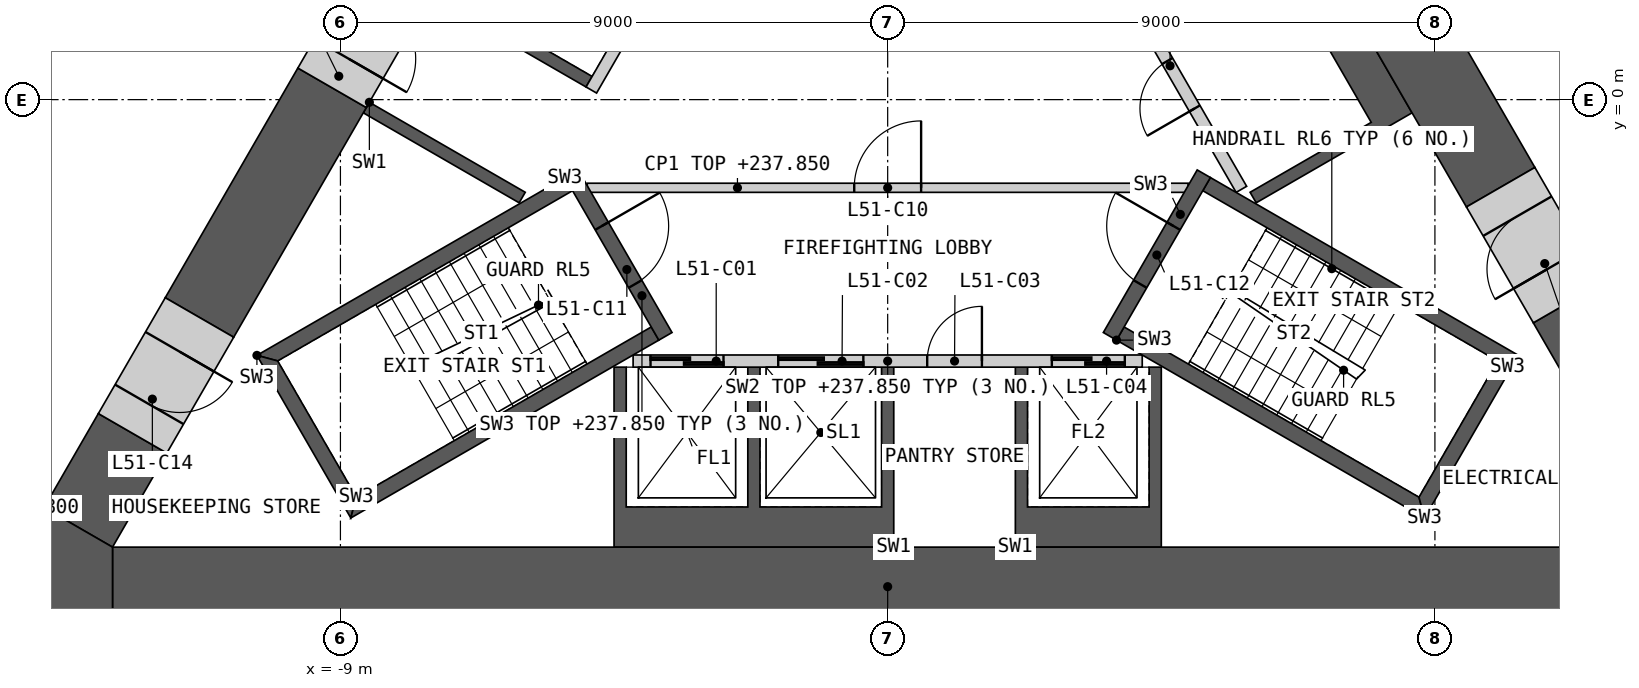
"""IFC4 building model, lengths in metres.
Left out: names, types, materials, properties, quantities, classifications, styles, units other than length and angle.
Written with IfcOpenShell. Run it as: python <this file> out.ifc"""

import sys

from ifc_helpers import new_model, si_unit, direction, frame, frame_2d, origin, place, context, subcontext, project, spatial, polyline, rectangle, outline, extrude, element, fill, save


model = new_model("IFC4")
c1 = context("Model", 3, precision=1e-05, world=origin(), true_north=direction((0.0, 1.0)))
c2 = subcontext(c1, "Body", "Model", "MODEL_VIEW")
j1 = project(units=[si_unit("LENGTHUNIT", "METRE"), si_unit("PLANEANGLEUNIT", "RADIAN")], contexts=[c1])
p1 = place(None, origin())
s1 = spatial("IfcSite", under=j1, at=p1, CompositionType="ELEMENT")
p2 = place(p1, origin())
s2 = spatial("IfcBuilding", under=s1, at=p2, CompositionType="ELEMENT")
p3 = place(p2, frame((0.0, 0.0, 234.6)))
s3 = spatial("IfcBuildingStorey", under=s2, at=p3, CompositionType="ELEMENT", Elevation=234.6)
p4 = place(p3, origin())
e1 = element("IfcWall", 1, at=p4, inside=s3, PredefinedType="SHEAR", context=c2, shape_type="SweptSolid", body=[
    extrude(outline(polyline([(0.1, -7.36), (-4.5, -7.36), (-4.5, -4.4), (-4.3, -4.4), (-4.3, -6.7), (-2.3, -6.7), (-2.3, -4.4), (-2.1, -4.4), (-2.1, -6.7), (-0.1, -6.7), (-0.1, -4.4), (0.1, -4.4), (0.1, -7.36)])), origin(), (0.0, 0.0, 1.0), 3.25),
])
p5 = place(p3, origin())
e2 = element("IfcWall", 2, at=p5, inside=s3, PredefinedType="SHEAR", context=c2, shape_type="SweptSolid", body=[
    extrude(outline(polyline([(2.1, -7.36), (2.1, -4.4), (2.3, -4.4), (2.3, -6.7), (4.3, -6.7), (4.3, -4.4), (4.5, -4.4), (4.5, -7.36), (2.1, -7.36)])), origin(), (0.0, 0.0, 1.0), 3.25),
])
p6 = place(p3, frame((-4.187, -4.3, 0.0), z_axis=(0.0, 0.0, 1.0), x_axis=(1.0, 0.0, 0.0)))
e3 = element("IfcWall", 3, at=p6, inside=s3, PredefinedType="SOLIDWALL", context=c2, shape_type="SweptSolid", body=[
    extrude(rectangle(XDim=8.373, YDim=0.2, at=frame_2d((4.187, 0.0))), origin(), (0.0, 0.0, 1.0), 3.25),
])
p7 = place(p6, frame((0.287, 0.0, 0.0)))
e4 = element("IfcOpeningElement", 4, at=p7, cuts=e3, PredefinedType="OPENING", context=c2, shape_type="SweptSolid", body=[
    extrude(rectangle(XDim=1.2, YDim=2.1, at=frame_2d((0.6, 1.05))), frame((0.0, 0.11, 0.0), z_axis=(0.0, -1.0, 0.0), x_axis=(1.0, 0.0, 0.0)), (0.0, 0.0, 1.0), 0.22),
])
p8 = place(p6, frame((2.387, 0.0, 0.0)))
e5 = element("IfcOpeningElement", 5, at=p8, cuts=e3, PredefinedType="OPENING", context=c2, shape_type="SweptSolid", body=[
    extrude(rectangle(XDim=1.4, YDim=2.1, at=frame_2d((0.7, 1.05))), frame((0.0, 0.11, 0.0), z_axis=(0.0, -1.0, 0.0), x_axis=(1.0, 0.0, 0.0)), (0.0, 0.0, 1.0), 0.22),
])
p9 = place(p6, frame((4.837, 0.0, 0.0)))
e6 = element("IfcOpeningElement", 6, at=p9, cuts=e3, PredefinedType="OPENING", context=c2, shape_type="SweptSolid", body=[
    extrude(rectangle(XDim=0.9, YDim=2.1, at=frame_2d((0.45, 1.05))), frame((0.0, 0.11, 0.0), z_axis=(0.0, -1.0, 0.0), x_axis=(1.0, 0.0, 0.0)), (0.0, 0.0, 1.0), 0.22),
])
p10 = place(p6, frame((6.887, 0.0, 0.0)))
e7 = element("IfcOpeningElement", 7, at=p10, cuts=e3, PredefinedType="OPENING", context=c2, shape_type="SweptSolid", body=[
    extrude(rectangle(XDim=1.2, YDim=2.1, at=frame_2d((0.6, 1.05))), frame((0.0, 0.11, 0.0), z_axis=(0.0, -1.0, 0.0), x_axis=(1.0, 0.0, 0.0)), (0.0, 0.0, 1.0), 0.22),
])
p11 = place(p3, origin())
e8 = element("IfcWall", 8, at=p11, inside=s3, PredefinedType="SHEAR", context=c2, shape_type="SweptSolid", body=[
    extrude(outline(polyline([(6.324, 3.767), (8.624, -0.217), (8.231, -0.444), (6.061, -1.697), (5.96, -1.524), (7.952, -0.374), (5.852, 3.263), (3.861, 2.113), (3.76, 2.287), (5.931, 3.54), (6.324, 3.767)])), origin(), (0.0, 0.0, 1.0), 3.25),
])
p12 = place(p3, frame((5.817, -1.476, 0.0), z_axis=(0.0, 0.0, 1.0), x_axis=(-0.500002616675, 0.866023893041, 0.0)))
e9 = element("IfcWall", 9, at=p12, inside=s3, PredefinedType="SOLIDWALL", context=c2, shape_type="SweptSolid", body=[
    extrude(rectangle(XDim=8.373, YDim=0.2, at=frame_2d((4.187, 0.0))), origin(), (0.0, 0.0, 1.0), 3.25),
])
p13 = place(p12, frame((1.537, 0.0, 0.0)))
e10 = element("IfcOpeningElement", 10, at=p13, cuts=e9, PredefinedType="OPENING", context=c2, shape_type="SweptSolid", body=[
    extrude(rectangle(XDim=0.9, YDim=2.1, at=frame_2d((0.45, 1.05))), frame((0.0, 0.11, 0.0), z_axis=(0.0, -1.0, 0.0), x_axis=(1.0, 0.0, 0.0)), (0.0, 0.0, 1.0), 0.22),
])
p14 = place(p12, frame((4.837, 0.0, 0.0)))
e11 = element("IfcOpeningElement", 11, at=p14, cuts=e9, PredefinedType="OPENING", context=c2, shape_type="SweptSolid", body=[
    extrude(rectangle(XDim=0.9, YDim=2.1, at=frame_2d((0.45, 1.05))), frame((0.0, 0.11, 0.0), z_axis=(0.0, -1.0, 0.0), x_axis=(1.0, 0.0, 0.0)), (0.0, 0.0, 1.0), 0.22),
])
p15 = place(p12, frame((6.937, 0.0, 0.0)))
e12 = element("IfcOpeningElement", 12, at=p15, cuts=e9, PredefinedType="OPENING", context=c2, shape_type="SweptSolid", body=[
    extrude(rectangle(XDim=1.1, YDim=2.1, at=frame_2d((0.55, 1.05))), frame((0.0, 0.11, 0.0), z_axis=(0.0, -1.0, 0.0), x_axis=(1.0, 0.0, 0.0)), (0.0, 0.0, 1.0), 0.22),
])
p16 = place(p3, origin())
e13 = element("IfcWall", 13, at=p16, inside=s3, PredefinedType="SHEAR", context=c2, shape_type="SweptSolid", body=[
    extrude(outline(polyline([(-7.524, 1.688), (-4.124, 7.577), (-3.731, 7.35), (-1.561, 6.097), (-1.66, 5.924), (-3.652, 7.074), (-4.652, 5.342), (-2.66, 4.192), (-2.76, 4.019), (-4.752, 5.169), (-5.752, 3.437), (-3.76, 2.287), (-3.861, 2.113), (-5.852, 3.263), (-6.852, 1.531), (-4.861, 0.381), (-4.96, 0.208), (-7.131, 1.461), (-7.524, 1.688)])), origin(), (0.0, 0.0, 1.0), 3.25),
])
p17 = place(p3, origin())
e14 = element("IfcWall", 14, at=p17, inside=s3, PredefinedType="SHEAR", context=c2, shape_type="SweptSolid", body=[
    extrude(outline(polyline([(-8.524, -0.044), (-8.131, -0.271), (-5.96, -1.524), (-6.061, -1.697), (-8.231, -0.444), (-8.624, -0.217), (-8.524, -0.044)])), origin(), (0.0, 0.0, 1.0), 3.25),
])
p18 = place(p3, frame((-1.631, 5.776, 0.0), z_axis=(0.0, 0.0, 1.0), x_axis=(-0.499992876559, -0.866029516466, 0.0)))
e15 = element("IfcWall", 15, at=p18, inside=s3, PredefinedType="SOLIDWALL", context=c2, shape_type="SweptSolid", body=[
    extrude(rectangle(XDim=6.486, YDim=0.2, at=frame_2d((3.243, 0.0))), origin(), (0.0, 0.0, 1.0), 3.25),
])
p19 = place(p18, frame((0.337, 0.0, 0.0)))
e16 = element("IfcOpeningElement", 16, at=p19, cuts=e15, PredefinedType="OPENING", context=c2, shape_type="SweptSolid", body=[
    extrude(rectangle(XDim=1.1, YDim=2.1, at=frame_2d((0.55, 1.05))), frame((0.0, 0.11, 0.0), z_axis=(0.0, -1.0, 0.0), x_axis=(1.0, 0.0, 0.0)), (0.0, 0.0, 1.0), 0.22),
])
p20 = place(p18, frame((2.537, 0.0, 0.0)))
e17 = element("IfcOpeningElement", 17, at=p20, cuts=e15, PredefinedType="OPENING", context=c2, shape_type="SweptSolid", body=[
    extrude(rectangle(XDim=1.1, YDim=2.1, at=frame_2d((0.55, 1.05))), frame((0.0, 0.11, 0.0), z_axis=(0.0, -1.0, 0.0), x_axis=(1.0, 0.0, 0.0)), (0.0, 0.0, 1.0), 0.22),
])
p21 = place(p3, frame((-4.941, -1.45, 0.0), z_axis=(0.0, 0.0, 1.0), x_axis=(1.0, 0.0, 0.0)))
e18 = element("IfcWall", 18, at=p21, inside=s3, PredefinedType="PARTITIONING", context=c2, shape_type="SweptSolid", body=[
    extrude(rectangle(XDim=9.882, YDim=0.15, at=frame_2d((4.941, 0.0))), origin(), (0.0, 0.0, 1.0), 3.25),
])
p22 = place(p21, frame((4.391, 0.0, 0.0)))
e19 = element("IfcOpeningElement", 19, at=p22, cuts=e18, PredefinedType="OPENING", context=c2, shape_type="SweptSolid", body=[
    extrude(rectangle(XDim=1.1, YDim=2.1, at=frame_2d((0.55, 1.05))), frame((0.0, 0.085, 0.0), z_axis=(0.0, -1.0, 0.0), x_axis=(1.0, 0.0, 0.0)), (0.0, 0.0, 1.0), 0.17),
])
p23 = place(p3, origin())
e20 = element("IfcWall", 20, at=p23, inside=s3, PredefinedType="SHEAR", context=c2, shape_type="SweptSolid", body=[
    extrude(outline(polyline([(-5.307, -1.281), (-10.374, -4.206), (-10.032, -4.298), (-5.182, -1.498), (-5.307, -1.281)])), origin(), (0.0, 0.0, 1.0), 3.25),
])
p24 = place(p3, origin())
e21 = element("IfcWall", 21, at=p24, inside=s3, PredefinedType="SHEAR", context=c2, shape_type="SweptSolid", body=[
    extrude(outline(polyline([(-10.374, -4.206), (-8.83, -6.881), (-8.738, -6.539), (-10.032, -4.298), (-10.374, -4.206)])), origin(), (0.0, 0.0, 1.0), 3.25),
])
p25 = place(p3, origin())
e22 = element("IfcWall", 22, at=p25, inside=s3, PredefinedType="SHEAR", context=c2, shape_type="SweptSolid", body=[
    extrude(outline(polyline([(-8.738, -6.539), (-8.83, -6.881), (-3.763, -3.956), (-3.888, -3.739), (-8.738, -6.539)])), origin(), (0.0, 0.0, 1.0), 3.25),
])
p26 = place(p3, frame((-5.199, -1.219, 0.0), z_axis=(0.0, 0.0, 1.0), x_axis=(0.499982516597, -0.866035497597, 0.0)))
e23 = element("IfcWall", 23, at=p26, inside=s3, PredefinedType="SHEAR", context=c2, shape_type="SweptSolid", body=[
    extrude(rectangle(XDim=3.088, YDim=0.25, at=frame_2d((1.544, 0.0))), origin(), (0.0, 0.0, 1.0), 3.25),
])
p27 = place(p26, frame((0.994, 0.0, 0.0)))
e24 = element("IfcOpeningElement", 24, at=p27, cuts=e23, PredefinedType="OPENING", context=c2, shape_type="SweptSolid", body=[
    extrude(rectangle(XDim=1.1, YDim=2.1, at=frame_2d((0.55, 1.05))), frame((0.0, 0.135, 0.0), z_axis=(0.0, -1.0, 0.0), x_axis=(1.0, 0.0, 0.0)), (0.0, 0.0, 1.0), 0.27),
])
p28 = place(p3, origin())
e25 = element("IfcWall", 25, at=p28, inside=s3, PredefinedType="SHEAR", context=c2, shape_type="SweptSolid", body=[
    extrude(outline(polyline([(3.763, -3.956), (8.83, -6.881), (8.738, -6.539), (3.888, -3.739), (3.763, -3.956)])), origin(), (0.0, 0.0, 1.0), 3.25),
])
p29 = place(p3, origin())
e26 = element("IfcWall", 26, at=p29, inside=s3, PredefinedType="SHEAR", context=c2, shape_type="SweptSolid", body=[
    extrude(outline(polyline([(8.83, -6.881), (10.374, -4.206), (10.032, -4.298), (8.738, -6.539), (8.83, -6.881)])), origin(), (0.0, 0.0, 1.0), 3.25),
])
p30 = place(p3, origin())
e27 = element("IfcWall", 27, at=p30, inside=s3, PredefinedType="SHEAR", context=c2, shape_type="SweptSolid", body=[
    extrude(outline(polyline([(10.032, -4.298), (10.374, -4.206), (5.307, -1.281), (5.182, -1.498), (10.032, -4.298)])), origin(), (0.0, 0.0, 1.0), 3.25),
])
p31 = place(p3, frame((3.655, -3.893, 0.0), z_axis=(0.0, 0.0, 1.0), x_axis=(0.499982516597, 0.866035497597, 0.0)))
e28 = element("IfcWall", 28, at=p31, inside=s3, PredefinedType="SHEAR", context=c2, shape_type="SweptSolid", body=[
    extrude(rectangle(XDim=3.088, YDim=0.25, at=frame_2d((1.544, 0.0))), origin(), (0.0, 0.0, 1.0), 3.25),
])
p32 = place(p31, frame((0.994, 0.0, 0.0)))
e29 = element("IfcOpeningElement", 29, at=p32, cuts=e28, PredefinedType="OPENING", context=c2, shape_type="SweptSolid", body=[
    extrude(rectangle(XDim=1.1, YDim=2.1, at=frame_2d((0.55, 1.05))), frame((0.0, 0.135, 0.0), z_axis=(0.0, -1.0, 0.0), x_axis=(1.0, 0.0, 0.0)), (0.0, 0.0, 1.0), 0.27),
])
p33 = place(p3, frame((-12.748, -8.01, 0.0), z_axis=(0.0, 0.0, 1.0), x_axis=(1.0, 0.0, 0.0)))
e30 = element("IfcWall", 30, at=p33, inside=s3, PredefinedType="SHEAR", context=c2, shape_type="SweptSolid", body=[
    extrude(rectangle(XDim=25.497, YDim=1.3, at=frame_2d((12.748, 0.0))), origin(), (0.0, 0.0, 1.0), 3.25),
])
p34 = place(p3, frame((10.081, -1.441, 0.0), z_axis=(0.0, 0.0, 1.0), x_axis=(-0.500012180433, 0.866018371294, 0.0)))
e31 = element("IfcWall", 31, at=p34, inside=s3, PredefinedType="SHEAR", context=c2, shape_type="SweptSolid", body=[
    extrude(rectangle(XDim=15.05, YDim=1.3, at=frame_2d((7.525, 0.0))), origin(), (0.0, 0.0, 1.0), 3.25),
])
p35 = place(p3, frame((13.311, -7.035, 0.0), z_axis=(0.0, 0.0, 1.0), x_axis=(-0.500003555838, 0.866023350811, 0.0)))
e32 = element("IfcWall", 32, at=p35, inside=s3, PredefinedType="SHEAR", context=c2, shape_type="SweptSolid", body=[
    extrude(rectangle(XDim=4.26, YDim=1.3, at=frame_2d((2.13, 0.0))), origin(), (0.0, 0.0, 1.0), 3.25),
])
p36 = place(p3, frame((-9.137, 0.195, 0.0), z_axis=(0.0, 0.0, 1.0), x_axis=(-0.499985697398, -0.866033661238, 0.0)))
e33 = element("IfcWall", 33, at=p36, inside=s3, PredefinedType="SHEAR", context=c2, shape_type="SweptSolid", body=[
    extrude(rectangle(XDim=4.362, YDim=1.3, at=frame_2d((2.181, 0.0))), origin(), (0.0, 0.0, 1.0), 3.25),
])
p37 = place(p3, frame((-12.418, -5.488, 0.0), z_axis=(0.0, 0.0, 1.0), x_axis=(-0.499931460552, -0.866064971437, 0.0)))
e34 = element("IfcWall", 34, at=p37, inside=s3, PredefinedType="SHEAR", context=c2, shape_type="SweptSolid", body=[
    extrude(rectangle(XDim=1.786, YDim=1.3, at=frame_2d((0.893, 0.0))), origin(), (0.0, 0.0, 1.0), 3.25),
])
p38 = place(p3, origin())
e35 = element("IfcWall", 35, at=p38, inside=s3, PredefinedType="SHEAR", context=c2, shape_type="SweptSolid", body=[
    extrude(outline(polyline([(-13.874, -6.71), (-12.748, -7.36), (-12.748, -8.66), (-15.0, -8.66), (-13.874, -6.71)])), origin(), (0.0, 0.0, 1.0), 3.25),
])
p39 = place(p3, frame((-11.318, -3.583, 0.0), z_axis=(0.0, 0.0, 1.0), x_axis=(-0.50002983664, -0.866008176907, 0.0)))
e36 = element("IfcWall", 36, at=p39, inside=s3, PredefinedType="SHEAR", context=c2, shape_type="SweptSolid", body=[
    extrude(rectangle(XDim=2.2, YDim=1.3, at=frame_2d((1.1, 0.0))), origin(), (0.0, 0.0, 1.0), 3.25),
])
p40 = place(p39, frame((0.65, 0.0, 0.0)))
e37 = element("IfcOpeningElement", 37, at=p40, cuts=e36, PredefinedType="OPENING", context=c2, shape_type="SweptSolid", body=[
    extrude(rectangle(XDim=1.0, YDim=2.1, at=frame_2d((0.5, 1.05))), frame((0.0, 0.66, 0.0), z_axis=(0.0, -1.0, 0.0), x_axis=(1.0, 0.0, 0.0)), (0.0, 0.0, 1.0), 1.32),
])
p41 = place(p3, frame((11.181, -3.346, 0.0), z_axis=(0.0, 0.0, 1.0), x_axis=(-0.499946605688, 0.86605622881, 0.0)))
e38 = element("IfcWall", 38, at=p41, inside=s3, PredefinedType="SHEAR", context=c2, shape_type="SweptSolid", body=[
    extrude(rectangle(XDim=2.2, YDim=1.3, at=frame_2d((1.1, 0.0))), origin(), (0.0, 0.0, 1.0), 3.25),
])
p42 = place(p41, frame((0.65, 0.0, 0.0)))
e39 = element("IfcOpeningElement", 39, at=p42, cuts=e38, PredefinedType="OPENING", context=c2, shape_type="SweptSolid", body=[
    extrude(rectangle(XDim=1.0, YDim=2.1, at=frame_2d((0.5, 1.05))), frame((0.0, 0.66, 0.0), z_axis=(0.0, -1.0, 0.0), x_axis=(1.0, 0.0, 0.0)), (0.0, 0.0, 1.0), 1.32),
])
p43 = place(p3, frame((-8.037, 2.1, 0.0), z_axis=(0.0, 0.0, 1.0), x_axis=(-0.50002983664, -0.866008176907, 0.0)))
e40 = element("IfcWall", 40, at=p43, inside=s3, PredefinedType="SHEAR", context=c2, shape_type="SweptSolid", body=[
    extrude(rectangle(XDim=2.2, YDim=1.3, at=frame_2d((1.1, 0.0))), origin(), (0.0, 0.0, 1.0), 3.25),
])
p44 = place(p43, frame((0.55, 0.0, 0.0)))
e41 = element("IfcOpeningElement", 41, at=p44, cuts=e40, PredefinedType="OPENING", context=c2, shape_type="SweptSolid", body=[
    extrude(rectangle(XDim=1.1, YDim=2.1, at=frame_2d((0.55, 1.05))), frame((0.0, 0.66, 0.0), z_axis=(0.0, -1.0, 0.0), x_axis=(1.0, 0.0, 0.0)), (0.0, 0.0, 1.0), 1.32),
])
p45 = place(p3, frame((-18.976, -4.747, 0.0), z_axis=(0.0, 0.0, 1.0), x_axis=(0.499999852422, 0.866025488988, 0.0)))
e42 = element("IfcWall", 42, at=p45, inside=s3, PredefinedType="PARTITIONING", context=c2, shape_type="SweptSolid", body=[
    extrude(rectangle(XDim=27.198, YDim=0.2, at=frame_2d((13.599, 0.0))), origin(), (0.0, 0.0, 1.0), 3.25),
])
p46 = place(p45, frame((25.346, 0.0, 0.0)))
e43 = element("IfcOpeningElement", 43, at=p46, cuts=e42, PredefinedType="OPENING", context=c2, shape_type="SweptSolid", body=[
    extrude(rectangle(XDim=1.1, YDim=2.1, at=frame_2d((0.55, 1.05))), frame((0.0, 0.11, 0.0), z_axis=(0.0, -1.0, 0.0), x_axis=(1.0, 0.0, 0.0)), (0.0, 0.0, 1.0), 0.22),
])
p47 = place(p45, frame((16.713, 0.0, 0.0)))
e44 = element("IfcOpeningElement", 44, at=p47, cuts=e42, PredefinedType="OPENING", context=c2, shape_type="SweptSolid", body=[
    extrude(rectangle(XDim=1.1, YDim=2.1, at=frame_2d((0.55, 1.05))), frame((0.0, 0.11, 0.0), z_axis=(0.0, -1.0, 0.0), x_axis=(1.0, 0.0, 0.0)), (0.0, 0.0, 1.0), 0.22),
])
p48 = place(p45, frame((0.35, 0.0, 0.0)))
e45 = element("IfcOpeningElement", 45, at=p48, cuts=e42, PredefinedType="OPENING", context=c2, shape_type="SweptSolid", body=[
    extrude(rectangle(XDim=1.1, YDim=2.1, at=frame_2d((0.55, 1.05))), frame((0.0, 0.11, 0.0), z_axis=(0.0, -1.0, 0.0), x_axis=(1.0, 0.0, 0.0)), (0.0, 0.0, 1.0), 0.22),
])
p49 = place(p3, frame((9.699, 5.321, 0.0), z_axis=(0.0, 0.0, 1.0), x_axis=(0.49998193945, -0.866035830797, 0.0)))
e46 = element("IfcWall", 46, at=p49, inside=s3, PredefinedType="PARTITIONING", context=c2, shape_type="SweptSolid", body=[
    extrude(rectangle(XDim=9.094, YDim=0.2, at=frame_2d((4.547, 0.0))), origin(), (0.0, 0.0, 1.0), 3.25),
])
p50 = place(p49, frame((5.212, 0.0, 0.0)))
e47 = element("IfcOpeningElement", 47, at=p50, cuts=e46, PredefinedType="OPENING", context=c2, shape_type="SweptSolid", body=[
    extrude(rectangle(XDim=1.0, YDim=2.1, at=frame_2d((0.5, 1.05))), frame((0.0, 0.11, 0.0), z_axis=(0.0, -1.0, 0.0), x_axis=(1.0, 0.0, 0.0)), (0.0, 0.0, 1.0), 0.22),
])
p51 = place(p49, frame((1.162, 0.0, 0.0)))
e48 = element("IfcOpeningElement", 48, at=p51, cuts=e46, PredefinedType="OPENING", context=c2, shape_type="SweptSolid", body=[
    extrude(rectangle(XDim=1.1, YDim=2.1, at=frame_2d((0.55, 1.05))), frame((0.0, 0.11, 0.0), z_axis=(0.0, -1.0, 0.0), x_axis=(1.0, 0.0, 0.0)), (0.0, 0.0, 1.0), 0.22),
])
p52 = place(p7, origin())
e49 = element("IfcDoor", 49, at=p52, inside=s3, OperationType="SLIDING_TO_LEFT", PredefinedType="DOOR", context=c2, shape_type="SweptSolid", body=[
    extrude(rectangle(XDim=1.2, YDim=2.1, at=frame_2d((0.6, 1.05))), frame((0.0, 0.025, 0.0), z_axis=(0.0, -1.0, 0.0), x_axis=(1.0, 0.0, 0.0)), (0.0, 0.0, 1.0), 0.05),
])
fill(e4, e49)
p53 = place(p8, origin())
e50 = element("IfcDoor", 50, at=p53, inside=s3, OperationType="SLIDING_TO_LEFT", PredefinedType="DOOR", context=c2, shape_type="SweptSolid", body=[
    extrude(rectangle(XDim=1.4, YDim=2.1, at=frame_2d((0.7, 1.05))), frame((0.0, 0.025, 0.0), z_axis=(0.0, -1.0, 0.0), x_axis=(1.0, 0.0, 0.0)), (0.0, 0.0, 1.0), 0.05),
])
fill(e5, e50)
p54 = place(p9, origin())
e51 = element("IfcDoor", 51, at=p54, inside=s3, OperationType="SINGLE_SWING_RIGHT", PredefinedType="DOOR", context=c2, shape_type="SweptSolid", body=[
    extrude(rectangle(XDim=0.9, YDim=2.1, at=frame_2d((0.45, 1.05))), frame((0.0, 0.025, 0.0), z_axis=(0.0, -1.0, 0.0), x_axis=(1.0, 0.0, 0.0)), (0.0, 0.0, 1.0), 0.05),
])
fill(e6, e51)
p55 = place(p10, origin())
e52 = element("IfcDoor", 52, at=p55, inside=s3, OperationType="SLIDING_TO_LEFT", PredefinedType="DOOR", context=c2, shape_type="SweptSolid", body=[
    extrude(rectangle(XDim=1.2, YDim=2.1, at=frame_2d((0.6, 1.05))), frame((0.0, 0.025, 0.0), z_axis=(0.0, -1.0, 0.0), x_axis=(1.0, 0.0, 0.0)), (0.0, 0.0, 1.0), 0.05),
])
fill(e7, e52)
p56 = place(p13, origin())
e53 = element("IfcDoor", 53, at=p56, inside=s3, OperationType="SINGLE_SWING_LEFT", PredefinedType="DOOR", context=c2, shape_type="SweptSolid", body=[
    extrude(rectangle(XDim=0.9, YDim=2.1, at=frame_2d((0.45, 1.05))), frame((0.0, 0.025, 0.0), z_axis=(0.0, -1.0, 0.0), x_axis=(1.0, 0.0, 0.0)), (0.0, 0.0, 1.0), 0.05),
])
fill(e10, e53)
p57 = place(p22, origin())
e54 = element("IfcDoor", 54, at=p57, inside=s3, OperationType="SINGLE_SWING_RIGHT", PredefinedType="DOOR", context=c2, shape_type="SweptSolid", body=[
    extrude(rectangle(XDim=1.1, YDim=2.1, at=frame_2d((0.55, 1.05))), frame((0.0, 0.025, 0.0), z_axis=(0.0, -1.0, 0.0), x_axis=(1.0, 0.0, 0.0)), (0.0, 0.0, 1.0), 0.05),
])
fill(e19, e54)
p58 = place(p27, origin())
e55 = element("IfcDoor", 55, at=p58, inside=s3, OperationType="SINGLE_SWING_LEFT", PredefinedType="DOOR", context=c2, shape_type="SweptSolid", body=[
    extrude(rectangle(XDim=1.1, YDim=2.1, at=frame_2d((0.55, 1.05))), frame((0.0, 0.025, 0.0), z_axis=(0.0, -1.0, 0.0), x_axis=(1.0, 0.0, 0.0)), (0.0, 0.0, 1.0), 0.05),
])
fill(e24, e55)
p59 = place(p32, origin())
e56 = element("IfcDoor", 56, at=p59, inside=s3, OperationType="SINGLE_SWING_RIGHT", PredefinedType="DOOR", context=c2, shape_type="SweptSolid", body=[
    extrude(rectangle(XDim=1.1, YDim=2.1, at=frame_2d((0.55, 1.05))), frame((0.0, 0.025, 0.0), z_axis=(0.0, -1.0, 0.0), x_axis=(1.0, 0.0, 0.0)), (0.0, 0.0, 1.0), 0.05),
])
fill(e29, e56)
p60 = place(p40, origin())
e57 = element("IfcDoor", 57, at=p60, inside=s3, OperationType="SINGLE_SWING_LEFT", PredefinedType="DOOR", context=c2, shape_type="SweptSolid", body=[
    extrude(rectangle(XDim=1.0, YDim=2.1, at=frame_2d((0.5, 1.05))), frame((0.0, 0.405, 0.0), z_axis=(0.0, -1.0, 0.0), x_axis=(1.0, 0.0, 0.0)), (0.0, 0.0, 1.0), 0.05),
])
fill(e37, e57)
p61 = place(p42, origin())
e58 = element("IfcDoor", 58, at=p61, inside=s3, OperationType="SINGLE_SWING_LEFT", PredefinedType="DOOR", context=c2, shape_type="SweptSolid", body=[
    extrude(rectangle(XDim=1.0, YDim=2.1, at=frame_2d((0.5, 1.05))), frame((0.0, 0.405, 0.0), z_axis=(0.0, -1.0, 0.0), x_axis=(1.0, 0.0, 0.0)), (0.0, 0.0, 1.0), 0.05),
])
fill(e39, e58)
p62 = place(p44, origin())
e59 = element("IfcDoor", 59, at=p62, inside=s3, OperationType="SINGLE_SWING_RIGHT", PredefinedType="DOOR", context=c2, shape_type="SweptSolid", body=[
    extrude(rectangle(XDim=1.1, YDim=2.1, at=frame_2d((0.55, 1.05))), frame((0.0, 0.405, 0.0), z_axis=(0.0, -1.0, 0.0), x_axis=(1.0, 0.0, 0.0)), (0.0, 0.0, 1.0), 0.05),
])
fill(e41, e59)
save(model, sys.argv[1])
